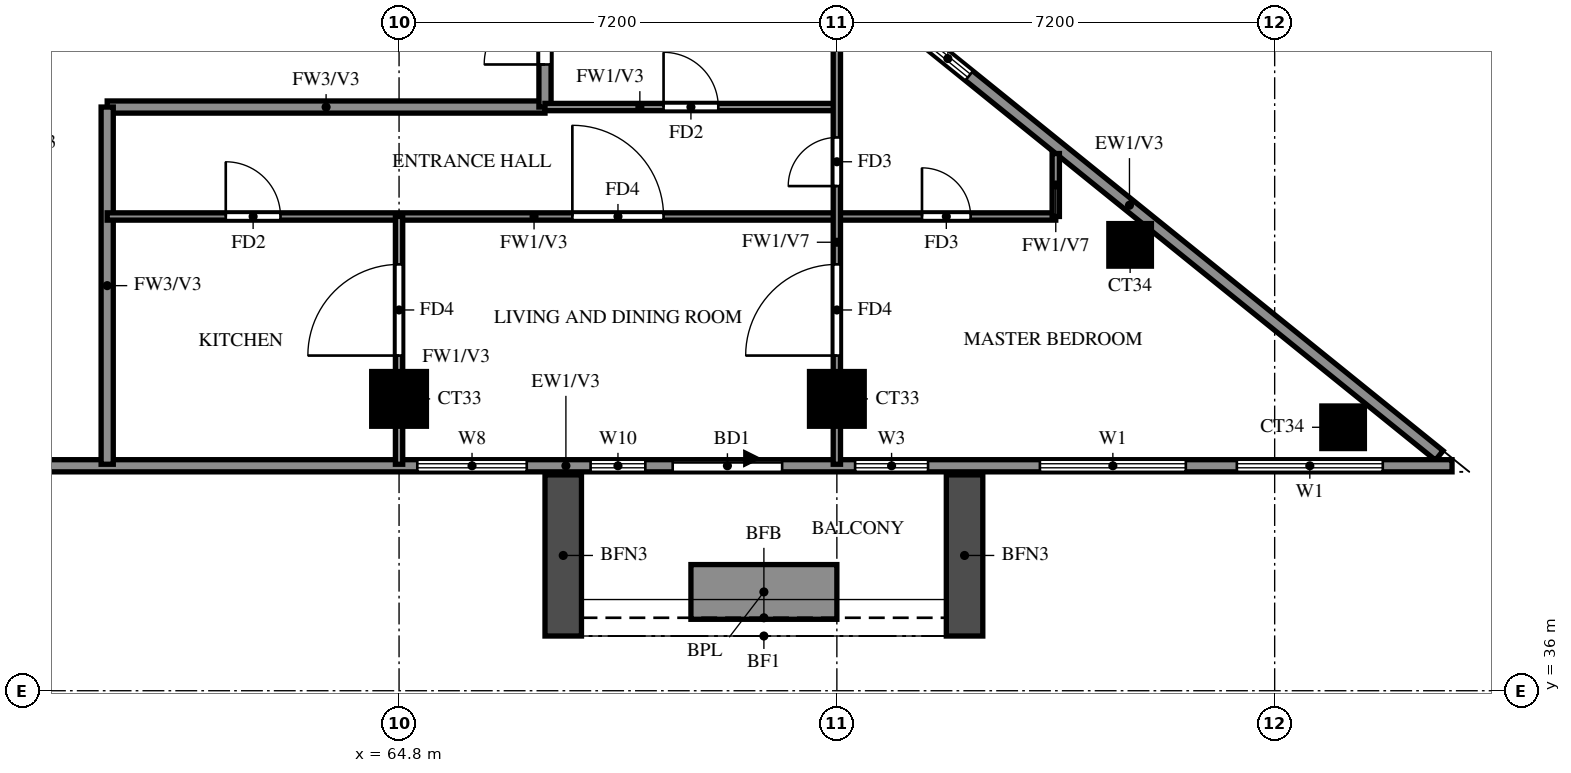
"""IFC4 building model, lengths in metres.
Left out: names, types, materials, properties, quantities, classifications, styles, units other than length and angle.
Written with IfcOpenShell. Run it as: python <this file> out.ifc"""

import sys

from ifc_helpers import new_model, si_unit, direction, frame, frame_2d, origin, origin_2d, place, context, subcontext, project, spatial, rectangle, extrude, source, transform, mapped, element, fill, save


model = new_model("IFC4")
c1 = context("Model", 3, precision=1e-05, world=origin(), true_north=direction((0.0, 1.0)))
c2 = subcontext(c1, "Body", "Model", "MODEL_VIEW")
j1 = project(units=[si_unit("LENGTHUNIT", "METRE"), si_unit("PLANEANGLEUNIT", "RADIAN")], contexts=[c1])
p1 = place(None, origin())
s1 = spatial("IfcSite", under=j1, at=p1, CompositionType="ELEMENT")
p2 = place(p1, origin())
s2 = spatial("IfcBuilding", under=s1, at=p2, CompositionType="ELEMENT")
p3 = place(p2, frame((0.0, 0.0, 215.0)))
s3 = spatial("IfcBuildingStorey", under=s2, at=p3, CompositionType="ELEMENT", Elevation=215.0)
m1 = source(origin(), c2, "Body", "SweptSolid", [
    extrude(rectangle(XDim=0.7, YDim=0.7, at=origin_2d()), origin(), (0.0, 0.0, 1.0), 3.22),
])
p4 = place(p3, frame((80.326, 40.333, 0.0), z_axis=(0.0, 0.0, 1.0), x_axis=(1.0, 0.0, 0.0)))
e1 = element("IfcColumn", 1, at=p4, inside=s3, PredefinedType="COLUMN", context=c2, shape_type="MappedRepresentation", body=[
    mapped(m1, transform((0.0, 0.0, 0.0))),
])
m2 = source(origin(), c2, "Body", "SweptSolid", [
    extrude(rectangle(XDim=0.9, YDim=0.9, at=origin_2d()), origin(), (0.0, 0.0, 1.0), 3.22),
])
for number, where, z_axis, x_axis in (
    (2, (64.8, 40.8, 0.0), (0.0, 0.0, 1.0), (1.0, 0.0, 0.0)),
    (3, (72.0, 40.8, 0.0), (0.0, 0.0, 1.0), (1.0, 0.0, 0.0)),
):
    element("IfcColumn", number, at=place(p3, frame(where, z_axis=z_axis, x_axis=x_axis)), inside=s3, PredefinedType="COLUMN", context=c2, shape_type="MappedRepresentation", body=[
        mapped(m2, transform((0.0, 0.0, 0.0))),
    ])
p5 = place(p3, frame((76.823, 43.333, 0.0), z_axis=(0.0, 0.0, 1.0), x_axis=(1.0, 0.0, 0.0)))
e4 = element("IfcColumn", 4, at=p5, inside=s3, PredefinedType="COLUMN", context=c2, shape_type="MappedRepresentation", body=[
    mapped(m1, transform((0.0, 0.0, 0.0))),
])
p6 = place(p3, frame((81.907, 39.87, 0.0), z_axis=(0.0, 0.0, 1.0), x_axis=(-0.777936274417, 0.62834318087, 0.0)))
e5 = element("IfcWall", 5, at=p6, inside=s3, PredefinedType="SOLIDWALL", context=c2, shape_type="SweptSolid", body=[
    extrude(rectangle(XDim=13.099, YDim=0.2, at=frame_2d((6.549, 0.0))), origin(), (0.0, 0.0, 1.0), 3.22),
])
p7 = place(p6, frame((9.938, 0.0, 1.5)))
e6 = element("IfcOpeningElement", 6, at=p7, cuts=e5, PredefinedType="OPENING", context=c2, shape_type="SweptSolid", body=[
    extrude(rectangle(XDim=0.9, YDim=0.9, at=frame_2d((0.45, 0.45))), frame((0.0, 0.11, 0.0), z_axis=(0.0, -1.0, 0.0), x_axis=(1.0, 0.0, 0.0)), (0.0, 0.0, 1.0), 0.22),
])
p8 = place(p3, frame((58.8, 39.7, 0.0), z_axis=(0.0, 0.0, 1.0), x_axis=(1.0, 0.0, 0.0)))
e7 = element("IfcWall", 7, at=p8, inside=s3, PredefinedType="SOLIDWALL", context=c2, shape_type="SweptSolid", body=[
    extrude(rectangle(XDim=23.317, YDim=0.2, at=frame_2d((11.658, 0.0))), origin(), (0.0, 0.0, 1.0), 3.22),
])
p9 = place(p8, frame((10.5, 0.0, 0.0)))
e8 = element("IfcOpeningElement", 8, at=p9, cuts=e7, PredefinedType="OPENING", context=c2, shape_type="SweptSolid", body=[
    extrude(rectangle(XDim=1.8, YDim=2.4, at=frame_2d((0.9, 1.2))), frame((0.0, 0.11, 0.0), z_axis=(0.0, -1.0, 0.0), x_axis=(1.0, 0.0, 0.0)), (0.0, 0.0, 1.0), 0.22),
])
p10 = place(p8, frame((6.3, 0.0, 0.6)))
e9 = element("IfcOpeningElement", 9, at=p10, cuts=e7, PredefinedType="OPENING", context=c2, shape_type="SweptSolid", body=[
    extrude(rectangle(XDim=1.8, YDim=2.4, at=frame_2d((0.9, 1.2))), frame((0.0, 0.11, 0.0), z_axis=(0.0, -1.0, 0.0), x_axis=(1.0, 0.0, 0.0)), (0.0, 0.0, 1.0), 0.22),
])
p11 = place(p8, frame((9.15, 0.0, 0.6)))
e10 = element("IfcOpeningElement", 10, at=p11, cuts=e7, PredefinedType="OPENING", context=c2, shape_type="SweptSolid", body=[
    extrude(rectangle(XDim=0.9, YDim=2.4, at=frame_2d((0.45, 1.2))), frame((0.0, 0.11, 0.0), z_axis=(0.0, -1.0, 0.0), x_axis=(1.0, 0.0, 0.0)), (0.0, 0.0, 1.0), 0.22),
])
p12 = place(p8, frame((13.5, 0.0, 0.6)))
e11 = element("IfcOpeningElement", 11, at=p12, cuts=e7, PredefinedType="OPENING", context=c2, shape_type="SweptSolid", body=[
    extrude(rectangle(XDim=1.2, YDim=2.4, at=frame_2d((0.6, 1.2))), frame((0.0, 0.11, 0.0), z_axis=(0.0, -1.0, 0.0), x_axis=(1.0, 0.0, 0.0)), (0.0, 0.0, 1.0), 0.22),
])
p13 = place(p8, frame((16.539, 0.0, 0.6)))
e12 = element("IfcOpeningElement", 12, at=p13, cuts=e7, PredefinedType="OPENING", context=c2, shape_type="SweptSolid", body=[
    extrude(rectangle(XDim=2.4, YDim=2.4, at=frame_2d((1.2, 1.2))), frame((0.0, 0.11, 0.0), z_axis=(0.0, -1.0, 0.0), x_axis=(1.0, 0.0, 0.0)), (0.0, 0.0, 1.0), 0.22),
])
p14 = place(p8, frame((19.778, 0.0, 0.6)))
e13 = element("IfcOpeningElement", 13, at=p14, cuts=e7, PredefinedType="OPENING", context=c2, shape_type="SweptSolid", body=[
    extrude(rectangle(XDim=2.4, YDim=2.4, at=frame_2d((1.2, 1.2))), frame((0.0, 0.11, 0.0), z_axis=(0.0, -1.0, 0.0), x_axis=(1.0, 0.0, 0.0)), (0.0, 0.0, 1.0), 0.22),
])
for number, where, z_axis, x_axis in (
    (14, (67.5, 39.55, 0.0), (0.0, 0.0, 1.0), (0.0, -1.0, 0.0)),
    (15, (74.1, 39.55, 0.0), (0.0, 0.0, 1.0), (0.0, -1.0, 0.0)),
):
    element("IfcWall", number, at=place(p3, frame(where, z_axis=z_axis, x_axis=x_axis)), inside=s3, PredefinedType="SOLIDWALL", context=c2, shape_type="SweptSolid", body=[
        extrude(rectangle(XDim=2.65, YDim=0.6, at=frame_2d((1.325, 0.0))), origin(), (0.0, 0.0, 1.0), 2.85),
    ])
p15 = place(p3, frame((69.6, 37.625, 0.0), z_axis=(0.0, 0.0, 1.0), x_axis=(1.0, 0.0, 0.0)))
e16 = element("IfcWall", 16, at=p15, inside=s3, PredefinedType="SOLIDWALL", context=c2, shape_type="SweptSolid", body=[
    extrude(rectangle(XDim=2.4, YDim=0.9, at=frame_2d((1.2, 0.0))), origin(), (0.0, 0.0, 1.0), 0.9),
])
p16 = place(p3, frame((60.0, 45.6, 0.0), z_axis=(0.0, 0.0, 1.0), x_axis=(1.0, 0.0, 0.0)))
e17 = element("IfcWall", 17, at=p16, inside=s3, PredefinedType="SOLIDWALL", context=c2, shape_type="SweptSolid", body=[
    extrude(rectangle(XDim=7.2, YDim=0.2, at=frame_2d((3.6, 0.0))), origin(), (0.0, 0.0, 1.0), 3.22),
])
p17 = place(p3, frame((60.0, 39.725, 0.0), z_axis=(0.0, 0.0, 1.0), x_axis=(0.0, 1.0, 0.0)))
e18 = element("IfcWall", 18, at=p17, inside=s3, PredefinedType="SOLIDWALL", context=c2, shape_type="SweptSolid", body=[
    extrude(rectangle(XDim=5.875, YDim=0.2, at=frame_2d((2.938, 0.0))), origin(), (0.0, 0.0, 1.0), 3.22),
])
p18 = place(p3, frame((67.2, 45.6, 0.0), z_axis=(0.0, 0.0, 1.0), x_axis=(0.0, 1.0, 0.0)))
e19 = element("IfcWall", 19, at=p18, inside=s3, PredefinedType="SOLIDWALL", context=c2, shape_type="SweptSolid", body=[
    extrude(rectangle(XDim=8.4, YDim=0.2, at=frame_2d((4.2, 0.0))), origin(), (0.0, 0.0, 1.0), 3.22),
])
p19 = place(p18, frame((6.7, 0.0, 0.0)))
e20 = element("IfcOpeningElement", 20, at=p19, cuts=e19, PredefinedType="OPENING", context=c2, shape_type="SweptSolid", body=[
    extrude(rectangle(XDim=1.0, YDim=2.1, at=frame_2d((0.5, 1.05))), frame((0.0, 0.11, 0.0), z_axis=(0.0, -1.0, 0.0), x_axis=(1.0, 0.0, 0.0)), (0.0, 0.0, 1.0), 0.22),
])
p20 = place(p18, frame((0.7, 0.0, 0.0)))
e21 = element("IfcOpeningElement", 21, at=p20, cuts=e19, PredefinedType="OPENING", context=c2, shape_type="SweptSolid", body=[
    extrude(rectangle(XDim=1.0, YDim=2.1, at=frame_2d((0.5, 1.05))), frame((0.0, 0.11, 0.0), z_axis=(0.0, -1.0, 0.0), x_axis=(1.0, 0.0, 0.0)), (0.0, 0.0, 1.0), 0.22),
])
p21 = place(p3, frame((60.0, 43.8, 0.0), z_axis=(0.0, 0.0, 1.0), x_axis=(1.0, 0.0, 0.0)))
e22 = element("IfcWall", 22, at=p21, inside=s3, PredefinedType="PARTITIONING", context=c2, shape_type="SweptSolid", body=[
    extrude(rectangle(XDim=15.6, YDim=0.12, at=frame_2d((7.8, 0.0))), origin(), (0.0, 0.0, 1.0), 3.22),
])
p22 = place(p21, frame((7.65, 0.0, 0.0)))
e23 = element("IfcOpeningElement", 23, at=p22, cuts=e22, PredefinedType="OPENING", context=c2, shape_type="SweptSolid", body=[
    extrude(rectangle(XDim=1.5, YDim=2.1, at=frame_2d((0.75, 1.05))), frame((0.0, 0.07, 0.0), z_axis=(0.0, -1.0, 0.0), x_axis=(1.0, 0.0, 0.0)), (0.0, 0.0, 1.0), 0.14),
])
p23 = place(p21, frame((1.95, 0.0, 0.0)))
e24 = element("IfcOpeningElement", 24, at=p23, cuts=e22, PredefinedType="OPENING", context=c2, shape_type="SweptSolid", body=[
    extrude(rectangle(XDim=0.9, YDim=2.1, at=frame_2d((0.45, 1.05))), frame((0.0, 0.07, 0.0), z_axis=(0.0, -1.0, 0.0), x_axis=(1.0, 0.0, 0.0)), (0.0, 0.0, 1.0), 0.14),
])
p24 = place(p21, frame((13.4, 0.0, 0.0)))
e25 = element("IfcOpeningElement", 25, at=p24, cuts=e22, PredefinedType="OPENING", context=c2, shape_type="SweptSolid", body=[
    extrude(rectangle(XDim=0.8, YDim=2.1, at=frame_2d((0.4, 1.05))), frame((0.0, 0.07, 0.0), z_axis=(0.0, -1.0, 0.0), x_axis=(1.0, 0.0, 0.0)), (0.0, 0.0, 1.0), 0.14),
])
p25 = place(p3, frame((67.2, 45.6, 0.0), z_axis=(0.0, 0.0, 1.0), x_axis=(1.0, 0.0, 0.0)))
e26 = element("IfcWall", 26, at=p25, inside=s3, PredefinedType="PARTITIONING", context=c2, shape_type="SweptSolid", body=[
    extrude(rectangle(XDim=4.8, YDim=0.12, at=frame_2d((2.4, 0.0))), origin(), (0.0, 0.0, 1.0), 3.22),
])
p26 = place(p25, frame((1.95, 0.0, 0.0)))
e27 = element("IfcOpeningElement", 27, at=p26, cuts=e26, PredefinedType="OPENING", context=c2, shape_type="SweptSolid", body=[
    extrude(rectangle(XDim=0.9, YDim=2.1, at=frame_2d((0.45, 1.05))), frame((0.0, 0.07, 0.0), z_axis=(0.0, -1.0, 0.0), x_axis=(1.0, 0.0, 0.0)), (0.0, 0.0, 1.0), 0.14),
])
p27 = place(p3, frame((64.8, 39.725, 0.0), z_axis=(0.0, 0.0, 1.0), x_axis=(0.0, 1.0, 0.0)))
e28 = element("IfcWall", 28, at=p27, inside=s3, PredefinedType="PARTITIONING", context=c2, shape_type="SweptSolid", body=[
    extrude(rectangle(XDim=4.075, YDim=0.12, at=frame_2d((2.038, 0.0))), origin(), (0.0, 0.0, 1.0), 3.22),
])
p28 = place(p27, frame((1.788, 0.0, 0.0)))
e29 = element("IfcOpeningElement", 29, at=p28, cuts=e28, PredefinedType="OPENING", context=c2, shape_type="SweptSolid", body=[
    extrude(rectangle(XDim=1.5, YDim=2.1, at=frame_2d((0.75, 1.05))), frame((0.0, 0.07, 0.0), z_axis=(0.0, -1.0, 0.0), x_axis=(1.0, 0.0, 0.0)), (0.0, 0.0, 1.0), 0.14),
])
p29 = place(p3, frame((72.0, 39.725, 0.0), z_axis=(0.0, 0.0, 1.0), x_axis=(0.0, 1.0, 0.0)))
e30 = element("IfcWall", 30, at=p29, inside=s3, PredefinedType="PARTITIONING", context=c2, shape_type="SweptSolid", body=[
    extrude(rectangle(XDim=8.114, YDim=0.12, at=frame_2d((4.057, 0.0))), origin(), (0.0, 0.0, 1.0), 2.32),
])
p30 = place(p29, frame((1.788, 0.0, 0.0)))
e31 = element("IfcOpeningElement", 31, at=p30, cuts=e30, PredefinedType="OPENING", context=c2, shape_type="SweptSolid", body=[
    extrude(rectangle(XDim=1.5, YDim=2.1, at=frame_2d((0.75, 1.05))), frame((0.0, 0.07, 0.0), z_axis=(0.0, -1.0, 0.0), x_axis=(1.0, 0.0, 0.0)), (0.0, 0.0, 1.0), 0.14),
])
p31 = place(p29, frame((4.575, 0.0, 0.0)))
e32 = element("IfcOpeningElement", 32, at=p31, cuts=e30, PredefinedType="OPENING", context=c2, shape_type="SweptSolid", body=[
    extrude(rectangle(XDim=0.8, YDim=2.1, at=frame_2d((0.4, 1.05))), frame((0.0, 0.07, 0.0), z_axis=(0.0, -1.0, 0.0), x_axis=(1.0, 0.0, 0.0)), (0.0, 0.0, 1.0), 0.14),
])
p32 = place(p3, frame((75.6, 43.8, 0.0), z_axis=(0.0, 0.0, 1.0), x_axis=(0.0, 1.0, 0.0)))
e33 = element("IfcWall", 33, at=p32, inside=s3, PredefinedType="PARTITIONING", context=c2, shape_type="SweptSolid", body=[
    extrude(rectangle(XDim=1.035, YDim=0.12, at=frame_2d((0.518, 0.0))), origin(), (0.0, 0.0, 1.0), 2.32),
])
p33 = place(p7, origin())
e34 = element("IfcWindow", 34, at=p33, inside=s3, PartitioningType="SINGLE_PANEL", PredefinedType="WINDOW", context=c2, shape_type="SweptSolid", body=[
    extrude(rectangle(XDim=0.9, YDim=0.9, at=frame_2d((0.45, 0.45))), frame((0.0, 0.03, 0.0), z_axis=(0.0, -1.0, 0.0), x_axis=(1.0, 0.0, 0.0)), (0.0, 0.0, 1.0), 0.06),
])
fill(e6, e34)
p34 = place(p9, origin())
e35 = element("IfcDoor", 35, at=p34, inside=s3, OperationType="DOUBLE_DOOR_SLIDING", PredefinedType="DOOR", context=c2, shape_type="SweptSolid", body=[
    extrude(rectangle(XDim=1.8, YDim=2.4, at=frame_2d((0.9, 1.2))), frame((0.0, 0.025, 0.0), z_axis=(0.0, -1.0, 0.0), x_axis=(1.0, 0.0, 0.0)), (0.0, 0.0, 1.0), 0.05),
])
fill(e8, e35)
p35 = place(p10, origin())
e36 = element("IfcWindow", 36, at=p35, inside=s3, PartitioningType="DOUBLE_PANEL_VERTICAL", PredefinedType="WINDOW", context=c2, shape_type="SweptSolid", body=[
    extrude(rectangle(XDim=1.8, YDim=2.4, at=frame_2d((0.9, 1.2))), frame((0.0, 0.03, 0.0), z_axis=(0.0, -1.0, 0.0), x_axis=(1.0, 0.0, 0.0)), (0.0, 0.0, 1.0), 0.06),
])
fill(e9, e36)
p36 = place(p11, origin())
e37 = element("IfcWindow", 37, at=p36, inside=s3, PartitioningType="SINGLE_PANEL", PredefinedType="WINDOW", context=c2, shape_type="SweptSolid", body=[
    extrude(rectangle(XDim=0.9, YDim=2.4, at=frame_2d((0.45, 1.2))), frame((0.0, 0.03, 0.0), z_axis=(0.0, -1.0, 0.0), x_axis=(1.0, 0.0, 0.0)), (0.0, 0.0, 1.0), 0.06),
])
fill(e10, e37)
p37 = place(p12, origin())
e38 = element("IfcWindow", 38, at=p37, inside=s3, PartitioningType="SINGLE_PANEL", PredefinedType="WINDOW", context=c2, shape_type="SweptSolid", body=[
    extrude(rectangle(XDim=1.2, YDim=2.4, at=frame_2d((0.6, 1.2))), frame((0.0, 0.03, 0.0), z_axis=(0.0, -1.0, 0.0), x_axis=(1.0, 0.0, 0.0)), (0.0, 0.0, 1.0), 0.06),
])
fill(e11, e38)
p38 = place(p13, origin())
e39 = element("IfcWindow", 39, at=p38, inside=s3, PartitioningType="DOUBLE_PANEL_VERTICAL", PredefinedType="WINDOW", context=c2, shape_type="SweptSolid", body=[
    extrude(rectangle(XDim=2.4, YDim=2.4, at=frame_2d((1.2, 1.2))), frame((0.0, 0.03, 0.0), z_axis=(0.0, -1.0, 0.0), x_axis=(1.0, 0.0, 0.0)), (0.0, 0.0, 1.0), 0.06),
])
fill(e12, e39)
p39 = place(p14, origin())
e40 = element("IfcWindow", 40, at=p39, inside=s3, PartitioningType="DOUBLE_PANEL_VERTICAL", PredefinedType="WINDOW", context=c2, shape_type="SweptSolid", body=[
    extrude(rectangle(XDim=2.4, YDim=2.4, at=frame_2d((1.2, 1.2))), frame((0.0, 0.03, 0.0), z_axis=(0.0, -1.0, 0.0), x_axis=(1.0, 0.0, 0.0)), (0.0, 0.0, 1.0), 0.06),
])
fill(e13, e40)
p40 = place(p28, origin())
e41 = element("IfcDoor", 41, at=p40, inside=s3, OperationType="SINGLE_SWING_LEFT", PredefinedType="DOOR", context=c2, shape_type="SweptSolid", body=[
    extrude(rectangle(XDim=1.5, YDim=2.1, at=frame_2d((0.75, 1.05))), frame((0.0, 0.025, 0.0), z_axis=(0.0, -1.0, 0.0), x_axis=(1.0, 0.0, 0.0)), (0.0, 0.0, 1.0), 0.05),
])
fill(e29, e41)
p41 = place(p26, origin())
e42 = element("IfcDoor", 42, at=p41, inside=s3, OperationType="SINGLE_SWING_LEFT", PredefinedType="DOOR", context=c2, shape_type="SweptSolid", body=[
    extrude(rectangle(XDim=0.9, YDim=2.1, at=frame_2d((0.45, 1.05))), frame((0.0, 0.025, 0.0), z_axis=(0.0, -1.0, 0.0), x_axis=(1.0, 0.0, 0.0)), (0.0, 0.0, 1.0), 0.05),
])
fill(e27, e42)
p42 = place(p20, origin())
e43 = element("IfcDoor", 43, at=p42, inside=s3, OperationType="SINGLE_SWING_LEFT", PredefinedType="DOOR", context=c2, shape_type="SweptSolid", body=[
    extrude(rectangle(XDim=1.0, YDim=2.1, at=frame_2d((0.5, 1.05))), frame((0.0, 0.025, 0.0), z_axis=(0.0, -1.0, 0.0), x_axis=(1.0, 0.0, 0.0)), (0.0, 0.0, 1.0), 0.05),
])
fill(e21, e43)
p43 = place(p22, origin())
e44 = element("IfcDoor", 44, at=p43, inside=s3, OperationType="SINGLE_SWING_RIGHT", PredefinedType="DOOR", context=c2, shape_type="SweptSolid", body=[
    extrude(rectangle(XDim=1.5, YDim=2.1, at=frame_2d((0.75, 1.05))), frame((0.0, 0.025, 0.0), z_axis=(0.0, -1.0, 0.0), x_axis=(1.0, 0.0, 0.0)), (0.0, 0.0, 1.0), 0.05),
])
fill(e23, e44)
p44 = place(p23, origin())
e45 = element("IfcDoor", 45, at=p44, inside=s3, OperationType="SINGLE_SWING_LEFT", PredefinedType="DOOR", context=c2, shape_type="SweptSolid", body=[
    extrude(rectangle(XDim=0.9, YDim=2.1, at=frame_2d((0.45, 1.05))), frame((0.0, 0.025, 0.0), z_axis=(0.0, -1.0, 0.0), x_axis=(1.0, 0.0, 0.0)), (0.0, 0.0, 1.0), 0.05),
])
fill(e24, e45)
p45 = place(p30, origin())
e46 = element("IfcDoor", 46, at=p45, inside=s3, OperationType="SINGLE_SWING_RIGHT", PredefinedType="DOOR", context=c2, shape_type="SweptSolid", body=[
    extrude(rectangle(XDim=1.5, YDim=2.1, at=frame_2d((0.75, 1.05))), frame((0.0, 0.025, 0.0), z_axis=(0.0, -1.0, 0.0), x_axis=(1.0, 0.0, 0.0)), (0.0, 0.0, 1.0), 0.05),
])
fill(e31, e46)
p46 = place(p31, origin())
e47 = element("IfcDoor", 47, at=p46, inside=s3, OperationType="SINGLE_SWING_RIGHT", PredefinedType="DOOR", context=c2, shape_type="SweptSolid", body=[
    extrude(rectangle(XDim=0.8, YDim=2.1, at=frame_2d((0.4, 1.05))), frame((0.0, 0.025, 0.0), z_axis=(0.0, -1.0, 0.0), x_axis=(1.0, 0.0, 0.0)), (0.0, 0.0, 1.0), 0.05),
])
fill(e32, e47)
p47 = place(p24, origin())
e48 = element("IfcDoor", 48, at=p47, inside=s3, OperationType="SINGLE_SWING_LEFT", PredefinedType="DOOR", context=c2, shape_type="SweptSolid", body=[
    extrude(rectangle(XDim=0.8, YDim=2.1, at=frame_2d((0.4, 1.05))), frame((0.0, 0.025, 0.0), z_axis=(0.0, -1.0, 0.0), x_axis=(1.0, 0.0, 0.0)), (0.0, 0.0, 1.0), 0.05),
])
fill(e25, e48)
save(model, sys.argv[1])
